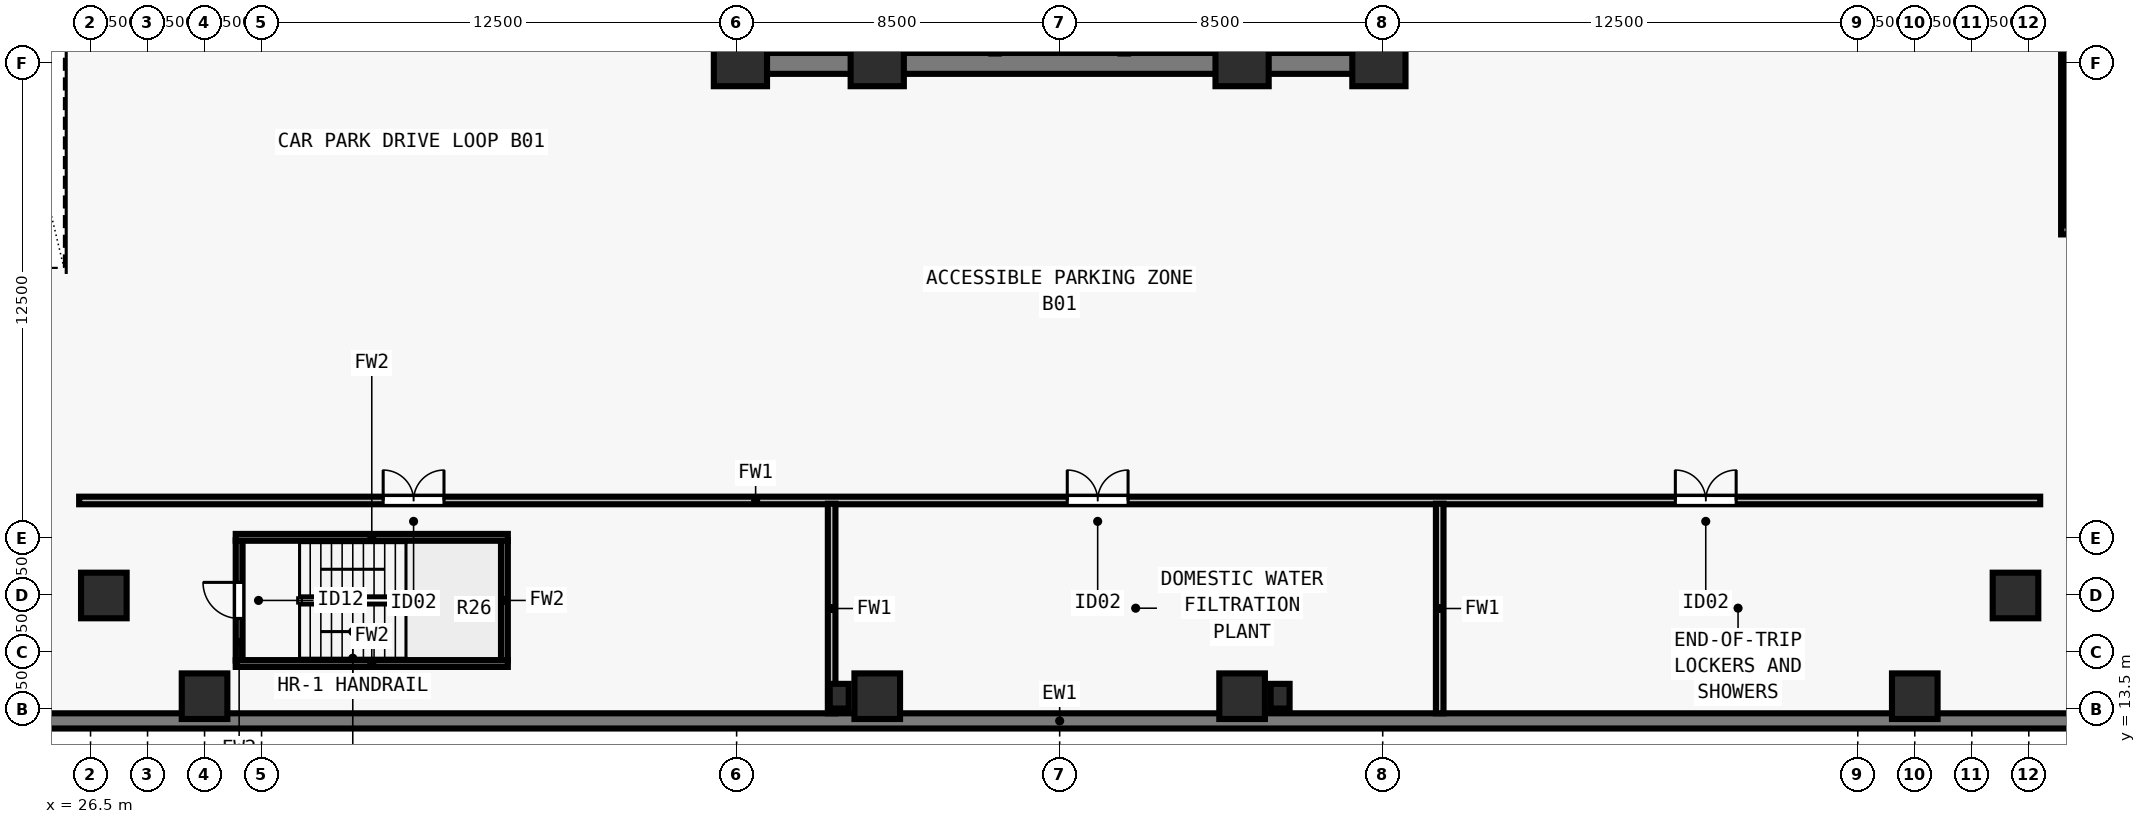
"""IFC4 building model, lengths in metres.
Left out: names, types, materials, properties, quantities, classifications, styles, units other than length and angle.
Written with IfcOpenShell. Run it as: python <this file> out.ifc"""

import sys

from ifc_helpers import new_model, si_unit, direction, frame, frame_2d, origin, origin_2d, place, context, subcontext, project, spatial, rectangle, extrude, element, fill, save


model = new_model("IFC4")
c1 = context("Model", 3, precision=1e-05, world=origin(), true_north=direction((0.0, 1.0)))
c2 = subcontext(c1, "Body", "Model", "MODEL_VIEW")
j1 = project(units=[si_unit("LENGTHUNIT", "METRE"), si_unit("PLANEANGLEUNIT", "RADIAN")], contexts=[c1])
p1 = place(None, origin())
s1 = spatial("IfcSite", under=j1, at=p1, CompositionType="ELEMENT")
p2 = place(p1, origin())
s2 = spatial("IfcBuilding", under=s1, at=p2, CompositionType="ELEMENT")
p3 = place(p2, frame((0.0, 0.0, -4.0)))
s3 = spatial("IfcBuildingStorey", under=s2, at=p3, CompositionType="ELEMENT", Elevation=-4.0)
for number, where, z_axis, x_axis in (
    (1, (43.6, 30.6, 0.0), (0.0, 0.0, 1.0), (1.0, 0.0, 0.0)),
    (2, (47.2, 30.6, 0.0), (0.0, 0.0, 1.0), (1.0, 0.0, 0.0)),
    (3, (56.8, 30.6, 0.0), (0.0, 0.0, 1.0), (1.0, 0.0, 0.0)),
    (4, (60.4, 30.6, 0.0), (0.0, 0.0, 1.0), (1.0, 0.0, 0.0)),
):
    element("IfcColumn", number, at=place(p3, frame(where, z_axis=z_axis, x_axis=x_axis)), inside=s3, PredefinedType="COLUMN", context=c2, shape_type="SweptSolid", body=[
        extrude(rectangle(XDim=1.4, YDim=1.4, at=origin_2d()), origin(), (0.0, 0.0, 1.0), 4.0),
    ])
for number, where, z_axis, x_axis in (
    (5, (29.5, 13.85, 0.0), (0.0, 0.0, 1.0), (1.0, 0.0, 0.0)),
    (6, (47.2, 13.85, 0.0), (0.0, 0.0, 1.0), (1.0, 0.0, 0.0)),
    (7, (56.8, 13.85, 0.0), (0.0, 0.0, 1.0), (1.0, 0.0, 0.0)),
    (8, (74.5, 13.85, 0.0), (0.0, 0.0, 1.0), (1.0, 0.0, 0.0)),
    (9, (77.15, 16.5, 0.0), (0.0, 0.0, 1.0), (1.0, 0.0, 0.0)),
    (10, (26.85, 16.5, 0.0), (0.0, 0.0, 1.0), (1.0, 0.0, 0.0)),
):
    element("IfcColumn", number, at=place(p3, frame(where, z_axis=z_axis, x_axis=x_axis)), inside=s3, PredefinedType="COLUMN", context=c2, shape_type="SweptSolid", body=[
        extrude(rectangle(XDim=1.2, YDim=1.2, at=origin_2d()), origin(), (0.0, 0.0, 1.0), 4.0),
    ])
for number, where, z_axis, x_axis in (
    (11, (46.2, 13.85, 0.0), (0.0, 0.0, 1.0), (1.0, 0.0, 0.0)),
    (12, (57.8, 13.85, 0.0), (0.0, 0.0, 1.0), (1.0, 0.0, 0.0)),
):
    element("IfcColumn", number, at=place(p3, frame(where, z_axis=z_axis, x_axis=x_axis)), inside=s3, PredefinedType="PILASTER", context=c2, shape_type="SweptSolid", body=[
        extrude(rectangle(XDim=0.5, YDim=0.65, at=origin_2d()), origin(), (0.0, 0.0, 1.0), 4.0),
    ])
p4 = place(p3, frame((85.0, 13.2, 0.0), z_axis=(0.0, 0.0, 1.0), x_axis=(-1.0, 0.0, 0.0)))
e13 = element("IfcWall", 13, at=p4, inside=s3, PredefinedType="USERDEFINED", context=c2, shape_type="SweptSolid", body=[
    extrude(rectangle(XDim=66.0, YDim=0.4, at=frame_2d((33.0, 0.0))), origin(), (0.0, 0.0, 1.0), 3.7),
])
p5 = place(p3, frame((43.225, 30.5, 0.0), z_axis=(0.0, 0.0, 1.0), x_axis=(1.0, 0.0, 0.0)))
e14 = element("IfcWall", 14, at=p5, inside=s3, PredefinedType="SHEAR", context=c2, shape_type="SweptSolid", body=[
    extrude(rectangle(XDim=17.55, YDim=0.55, at=frame_2d((8.775, 0.0))), origin(), (0.0, 0.0, 1.0), 3.7),
])
for number, where, z_axis, x_axis in (
    (15, (43.5, 30.765, 0.0), (0.0, 0.0, 1.0), (0.0, 1.0, 0.0)),
    (16, (60.5, 30.765, 0.0), (0.0, 0.0, 1.0), (0.0, 1.0, 0.0)),
):
    element("IfcWall", number, at=place(p3, frame(where, z_axis=z_axis, x_axis=x_axis)), inside=s3, PredefinedType="SHEAR", context=c2, shape_type="SweptSolid", body=[
        extrude(rectangle(XDim=7.985, YDim=0.55, at=frame_2d((3.993, 0.0))), origin(), (0.0, 0.0, 1.0), 3.7),
    ])
for number, where, z_axis, x_axis in (
    (17, (50.3, 30.76, 0.0), (0.0, 0.0, 1.0), (0.0, 1.0, 0.0)),
    (18, (53.7, 30.76, 0.0), (0.0, 0.0, 1.0), (0.0, 1.0, 0.0)),
):
    element("IfcWall", number, at=place(p3, frame(where, z_axis=z_axis, x_axis=x_axis)), inside=s3, PredefinedType="SOLIDWALL", context=c2, shape_type="SweptSolid", body=[
        extrude(rectangle(XDim=7.855, YDim=0.2, at=frame_2d((3.927, 0.0))), origin(), (0.0, 0.0, 1.0), 3.7),
    ])
for number, where, z_axis, x_axis in (
    (19, (47.35, 30.76, 0.0), (0.0, 0.0, 1.0), (0.0, 1.0, 0.0)),
    (20, (56.65, 30.76, 0.0), (0.0, 0.0, 1.0), (0.0, 1.0, 0.0)),
):
    element("IfcWall", number, at=place(p3, frame(where, z_axis=z_axis, x_axis=x_axis)), inside=s3, PredefinedType="SOLIDWALL", context=c2, shape_type="SweptSolid", body=[
        extrude(rectangle(XDim=7.855, YDim=0.18, at=frame_2d((3.927, 0.0))), origin(), (0.0, 0.0, 1.0), 3.7),
    ])
p6 = place(p3, frame((26.2, 19.0, 0.0), z_axis=(0.0, 0.0, 1.0), x_axis=(1.0, 0.0, 0.0)))
e21 = element("IfcWall", 21, at=p6, inside=s3, PredefinedType="SOLIDWALL", context=c2, shape_type="SweptSolid", body=[
    extrude(rectangle(XDim=51.6, YDim=0.2, at=frame_2d((25.8, 0.0))), origin(), (0.0, 0.0, 1.0), 3.218),
])
p7 = place(p6, frame((8.0, 0.0, 0.0)))
e22 = element("IfcOpeningElement", 22, at=p7, cuts=e21, PredefinedType="OPENING", context=c2, shape_type="SweptSolid", body=[
    extrude(rectangle(XDim=1.6, YDim=2.2, at=frame_2d((0.8, 1.1))), frame((0.0, 0.11, 0.0), z_axis=(0.0, -1.0, 0.0), x_axis=(1.0, 0.0, 0.0)), (0.0, 0.0, 1.0), 0.22),
])
p8 = place(p6, frame((26.0, 0.0, 0.0)))
e23 = element("IfcOpeningElement", 23, at=p8, cuts=e21, PredefinedType="OPENING", context=c2, shape_type="SweptSolid", body=[
    extrude(rectangle(XDim=1.6, YDim=2.2, at=frame_2d((0.8, 1.1))), frame((0.0, 0.11, 0.0), z_axis=(0.0, -1.0, 0.0), x_axis=(1.0, 0.0, 0.0)), (0.0, 0.0, 1.0), 0.22),
])
p9 = place(p6, frame((42.0, 0.0, 0.0)))
e24 = element("IfcOpeningElement", 24, at=p9, cuts=e21, PredefinedType="OPENING", context=c2, shape_type="SweptSolid", body=[
    extrude(rectangle(XDim=1.6, YDim=2.2, at=frame_2d((0.8, 1.1))), frame((0.0, 0.11, 0.0), z_axis=(0.0, -1.0, 0.0), x_axis=(1.0, 0.0, 0.0)), (0.0, 0.0, 1.0), 0.22),
])
for number, where, z_axis, x_axis in (
    (25, (46.0, 13.4, 0.0), (0.0, 0.0, 1.0), (0.0, 1.0, 0.0)),
    (26, (62.0, 13.4, 0.0), (0.0, 0.0, 1.0), (0.0, 1.0, 0.0)),
):
    element("IfcWall", number, at=place(p3, frame(where, z_axis=z_axis, x_axis=x_axis)), inside=s3, PredefinedType="SOLIDWALL", context=c2, shape_type="SweptSolid", body=[
        extrude(rectangle(XDim=5.515, YDim=0.2, at=frame_2d((2.758, 0.0))), origin(), (0.0, 0.0, 1.0), 3.7),
    ])
for number, where, z_axis, x_axis in (
    (27, (47.07, 38.78, 0.0), (0.0, 0.0, 1.0), (0.0, -1.0, 0.0)),
    (28, (56.93, 38.78, 0.0), (0.0, 0.0, 1.0), (0.0, -1.0, 0.0)),
):
    element("IfcWall", number, at=place(p3, frame(where, z_axis=z_axis, x_axis=x_axis)), inside=s3, PredefinedType="SOLIDWALL", context=c2, shape_type="SweptSolid", body=[
        extrude(rectangle(XDim=8.017, YDim=0.18, at=frame_2d((4.009, 0.0))), origin(), (0.0, 0.0, 1.0), 3.7),
    ])
p10 = place(p3, frame((30.41, 14.785, 0.0), z_axis=(0.0, 0.0, 1.0), x_axis=(0.0, 1.0, 0.0)))
e29 = element("IfcWall", 29, at=p10, inside=s3, PredefinedType="SOLIDWALL", context=c2, shape_type="SweptSolid", body=[
    extrude(rectangle(XDim=3.17, YDim=0.18, at=frame_2d((1.585, 0.0))), origin(), (0.0, 0.0, 1.0), 3.7),
])
p11 = place(p10, frame((1.11, 0.0, 0.0)))
e30 = element("IfcOpeningElement", 30, at=p11, cuts=e29, PredefinedType="OPENING", context=c2, shape_type="SweptSolid", body=[
    extrude(rectangle(XDim=0.95, YDim=2.15, at=frame_2d((0.475, 1.075))), frame((0.0, 0.1, 0.0), z_axis=(0.0, -1.0, 0.0), x_axis=(1.0, 0.0, 0.0)), (0.0, 0.0, 1.0), 0.2),
])
p12 = place(p3, frame((37.39, 14.785, 0.0), z_axis=(0.0, 0.0, 1.0), x_axis=(0.0, 1.0, 0.0)))
e31 = element("IfcWall", 31, at=p12, inside=s3, PredefinedType="SOLIDWALL", context=c2, shape_type="SweptSolid", body=[
    extrude(rectangle(XDim=3.17, YDim=0.18, at=frame_2d((1.585, 0.0))), origin(), (0.0, 0.0, 1.0), 3.7),
])
for number, where, z_axis, x_axis in (
    (32, (30.32, 14.71, 0.0), (0.0, 0.0, 1.0), (1.0, 0.0, 0.0)),
    (33, (30.32, 18.03, 0.0), (0.0, 0.0, 1.0), (1.0, 0.0, 0.0)),
):
    element("IfcWall", number, at=place(p3, frame(where, z_axis=z_axis, x_axis=x_axis)), inside=s3, PredefinedType="SOLIDWALL", context=c2, shape_type="SweptSolid", body=[
        extrude(rectangle(XDim=7.16, YDim=0.18, at=frame_2d((3.58, 0.0))), origin(), (0.0, 0.0, 1.0), 3.7),
    ])
p13 = place(p3, frame((78.45, 26.0, 0.0), z_axis=(0.0, 0.0, 1.0), x_axis=(0.0, 1.0, 0.0)))
e34 = element("IfcWall", 34, at=p13, inside=s3, PredefinedType="SOLIDWALL", context=c2, shape_type="SweptSolid", body=[
    extrude(rectangle(XDim=28.075, YDim=0.2, at=frame_2d((14.038, 0.0))), origin(), (0.0, 0.0, 1.0), 3.7),
])
p14 = place(p7, origin())
e35 = element("IfcDoor", 35, at=p14, inside=s3, OperationType="DOUBLE_DOOR_SINGLE_SWING", PredefinedType="DOOR", context=c2, shape_type="SweptSolid", body=[
    extrude(rectangle(XDim=1.6, YDim=2.2, at=frame_2d((0.8, 1.1))), frame((0.0, 0.025, 0.0), z_axis=(0.0, -1.0, 0.0), x_axis=(1.0, 0.0, 0.0)), (0.0, 0.0, 1.0), 0.05),
])
fill(e22, e35)
p15 = place(p8, origin())
e36 = element("IfcDoor", 36, at=p15, inside=s3, OperationType="DOUBLE_DOOR_SINGLE_SWING", PredefinedType="DOOR", context=c2, shape_type="SweptSolid", body=[
    extrude(rectangle(XDim=1.6, YDim=2.2, at=frame_2d((0.8, 1.1))), frame((0.0, 0.025, 0.0), z_axis=(0.0, -1.0, 0.0), x_axis=(1.0, 0.0, 0.0)), (0.0, 0.0, 1.0), 0.05),
])
fill(e23, e36)
p16 = place(p9, origin())
e37 = element("IfcDoor", 37, at=p16, inside=s3, OperationType="DOUBLE_DOOR_SINGLE_SWING", PredefinedType="DOOR", context=c2, shape_type="SweptSolid", body=[
    extrude(rectangle(XDim=1.6, YDim=2.2, at=frame_2d((0.8, 1.1))), frame((0.0, 0.025, 0.0), z_axis=(0.0, -1.0, 0.0), x_axis=(1.0, 0.0, 0.0)), (0.0, 0.0, 1.0), 0.05),
])
fill(e24, e37)
p17 = place(p11, origin())
e38 = element("IfcDoor", 38, at=p17, inside=s3, OperationType="SINGLE_SWING_RIGHT", PredefinedType="DOOR", context=c2, shape_type="SweptSolid", body=[
    extrude(rectangle(XDim=0.95, YDim=2.15, at=frame_2d((0.475, 1.075))), frame((0.0, 0.025, 0.0), z_axis=(0.0, -1.0, 0.0), x_axis=(1.0, 0.0, 0.0)), (0.0, 0.0, 1.0), 0.05),
])
fill(e30, e38)
save(model, sys.argv[1])
